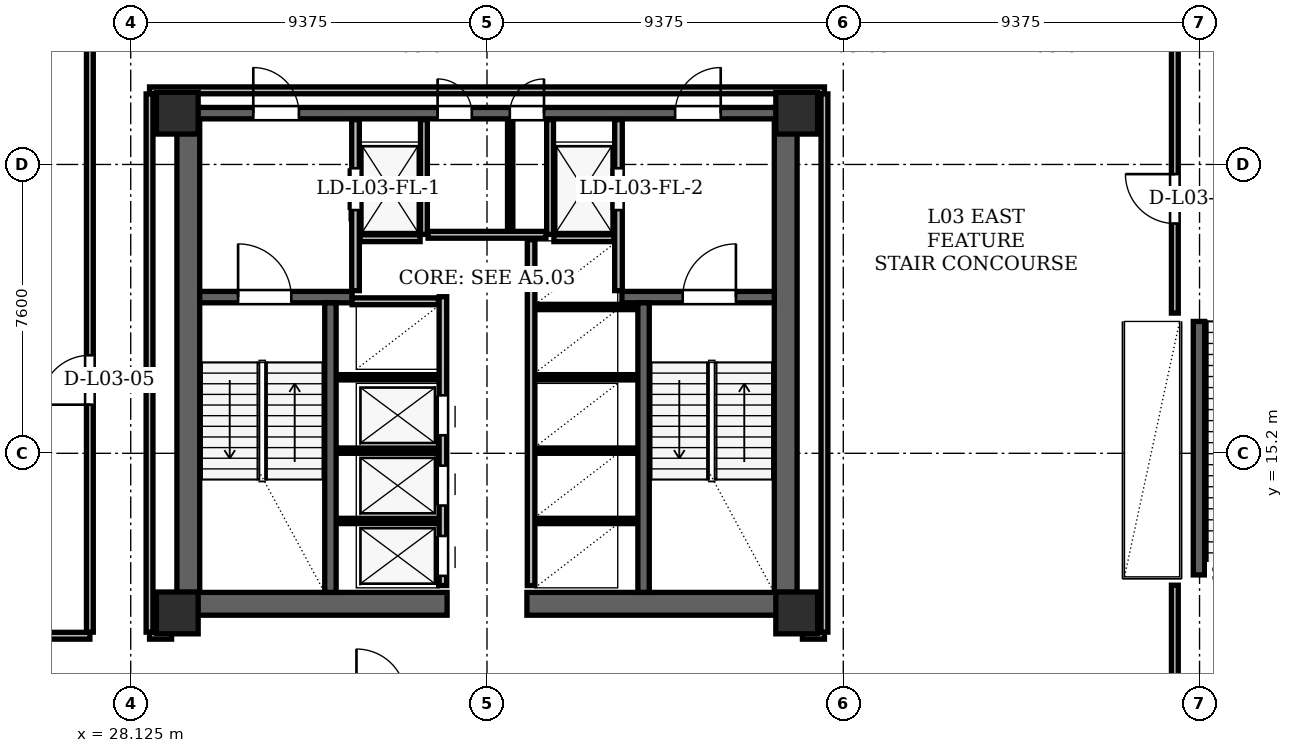
"""IFC4 building model, lengths in metres.
Left out: names, types, materials, properties, quantities, classifications, styles, units other than length and angle.
Written with IfcOpenShell. Run it as: python <this file> out.ifc"""

import sys

from ifc_helpers import new_model, si_unit, direction, frame, frame_2d, origin, origin_2d, place, context, subcontext, project, spatial, rectangle, hollow_rectangle, extrude, element, fill, save


model = new_model("IFC4")
c1 = context("Model", 3, precision=1e-05, world=origin(), true_north=direction((0.0, 1.0)))
c2 = subcontext(c1, "Body", "Model", "MODEL_VIEW")
j1 = project(units=[si_unit("LENGTHUNIT", "METRE"), si_unit("PLANEANGLEUNIT", "RADIAN")], contexts=[c1])
p1 = place(None, origin())
s1 = spatial("IfcSite", under=j1, at=p1, CompositionType="ELEMENT")
p2 = place(p1, origin())
s2 = spatial("IfcBuilding", under=s1, at=p2, CompositionType="ELEMENT")
p3 = place(p2, frame((0.0, 0.0, 14.1)))
s3 = spatial("IfcBuildingStorey", under=s2, at=p3, CompositionType="ELEMENT", Elevation=14.1)
for number, where, z_axis, x_axis in (
    (1, (29.35, 11.0, 0.0), (0.0, 0.0, 1.0), (1.0, 0.0, 0.0)),
    (2, (45.65, 11.0, 0.0), (0.0, 0.0, 1.0), (1.0, 0.0, 0.0)),
    (3, (45.65, 24.15, 0.0), (0.0, 0.0, 1.0), (1.0, 0.0, 0.0)),
    (4, (29.35, 24.15, 0.0), (0.0, 0.0, 1.0), (1.0, 0.0, 0.0)),
):
    element("IfcColumn", number, at=place(p3, frame(where, z_axis=z_axis, x_axis=x_axis)), inside=s3, PredefinedType="COLUMN", context=c2, shape_type="SweptSolid", body=[
        extrude(hollow_rectangle(XDim=1.1, YDim=1.1, WallThickness=0.09, at=origin_2d()), origin(), (0.0, 0.0, 1.0), 4.2),
    ])
for number, where, z_axis, x_axis in (
    (5, (29.64, 11.0, 0.0), (0.0, 0.0, 1.0), (0.0, 1.0, 0.0)),
    (6, (45.36, 11.0, 0.0), (0.0, 0.0, 1.0), (0.0, 1.0, 0.0)),
):
    element("IfcWall", number, at=place(p3, frame(where, z_axis=z_axis, x_axis=x_axis)), inside=s3, PredefinedType="SHEAR", context=c2, shape_type="SweptSolid", body=[
        extrude(rectangle(XDim=13.3, YDim=0.6, at=frame_2d((6.65, 0.0))), origin(), (0.0, 0.0, 1.0), 3.92),
    ])
for number, where, z_axis, x_axis in (
    (7, (29.35, 11.24, 0.0), (0.0, 0.0, 1.0), (1.0, 0.0, 0.0)),
    (8, (38.55, 11.24, 0.0), (0.0, 0.0, 1.0), (1.0, 0.0, 0.0)),
):
    element("IfcWall", number, at=place(p3, frame(where, z_axis=z_axis, x_axis=x_axis)), inside=s3, PredefinedType="SHEAR", context=c2, shape_type="SweptSolid", body=[
        extrude(rectangle(XDim=7.1, YDim=0.6, at=frame_2d((3.55, 0.0))), origin(), (0.0, 0.0, 1.0), 3.92),
    ])
p4 = place(p3, frame((29.65, 24.15, 0.0), z_axis=(0.0, 0.0, 1.0), x_axis=(1.0, 0.0, 0.0)))
e9 = element("IfcWall", 9, at=p4, inside=s3, PredefinedType="SHEAR", context=c2, shape_type="SweptSolid", body=[
    extrude(rectangle(XDim=15.7, YDim=0.3, at=frame_2d((7.85, 0.0))), origin(), (0.0, 0.0, 1.0), 3.92),
])
p5 = place(p4, frame((1.7, 0.0, 0.0)))
e10 = element("IfcOpeningElement", 10, at=p5, cuts=e9, PredefinedType="OPENING", context=c2, shape_type="SweptSolid", body=[
    extrude(rectangle(XDim=1.2, YDim=2.2, at=frame_2d((0.6, 1.1))), frame((0.0, 0.15, 0.0), z_axis=(0.0, -1.0, 0.0), x_axis=(1.0, 0.0, 0.0)), (0.0, 0.0, 1.0), 0.3),
])
p6 = place(p4, frame((12.8, 0.0, 0.0)))
e11 = element("IfcOpeningElement", 11, at=p6, cuts=e9, PredefinedType="OPENING", context=c2, shape_type="SweptSolid", body=[
    extrude(rectangle(XDim=1.2, YDim=2.2, at=frame_2d((0.6, 1.1))), frame((0.0, 0.15, 0.0), z_axis=(0.0, -1.0, 0.0), x_axis=(1.0, 0.0, 0.0)), (0.0, 0.0, 1.0), 0.3),
])
p7 = place(p4, frame((6.55, 0.0, 0.0)))
e12 = element("IfcOpeningElement", 12, at=p7, cuts=e9, PredefinedType="OPENING", context=c2, shape_type="SweptSolid", body=[
    extrude(rectangle(XDim=0.9, YDim=2.05, at=frame_2d((0.45, 1.025))), frame((0.0, 0.15, 0.0), z_axis=(0.0, -1.0, 0.0), x_axis=(1.0, 0.0, 0.0)), (0.0, 0.0, 1.0), 0.3),
])
p8 = place(p4, frame((8.45, 0.0, 0.0)))
e13 = element("IfcOpeningElement", 13, at=p8, cuts=e9, PredefinedType="OPENING", context=c2, shape_type="SweptSolid", body=[
    extrude(rectangle(XDim=0.9, YDim=2.05, at=frame_2d((0.45, 1.025))), frame((0.0, 0.15, 0.0), z_axis=(0.0, -1.0, 0.0), x_axis=(1.0, 0.0, 0.0)), (0.0, 0.0, 1.0), 0.3),
])
p9 = place(p3, frame((29.94, 19.31, 0.0), z_axis=(0.0, 0.0, 1.0), x_axis=(1.0, 0.0, 0.0)))
e14 = element("IfcWall", 14, at=p9, inside=s3, PredefinedType="SHEAR", context=c2, shape_type="SweptSolid", body=[
    extrude(rectangle(XDim=4.01, YDim=0.3, at=frame_2d((2.005, 0.0))), origin(), (0.0, 0.0, 1.0), 3.92),
])
p10 = place(p9, frame((1.01, 0.0, 0.0)))
e15 = element("IfcOpeningElement", 15, at=p10, cuts=e14, PredefinedType="OPENING", context=c2, shape_type="SweptSolid", body=[
    extrude(rectangle(XDim=1.4, YDim=2.2, at=frame_2d((0.7, 1.1))), frame((0.0, 0.15, 0.0), z_axis=(0.0, -1.0, 0.0), x_axis=(1.0, 0.0, 0.0)), (0.0, 0.0, 1.0), 0.3),
])
p11 = place(p3, frame((41.05, 19.31, 0.0), z_axis=(0.0, 0.0, 1.0), x_axis=(1.0, 0.0, 0.0)))
e16 = element("IfcWall", 16, at=p11, inside=s3, PredefinedType="SHEAR", context=c2, shape_type="SweptSolid", body=[
    extrude(rectangle(XDim=4.01, YDim=0.3, at=frame_2d((2.005, 0.0))), origin(), (0.0, 0.0, 1.0), 3.92),
])
p12 = place(p11, frame((1.6, 0.0, 0.0)))
e17 = element("IfcOpeningElement", 17, at=p12, cuts=e16, PredefinedType="OPENING", context=c2, shape_type="SweptSolid", body=[
    extrude(rectangle(XDim=1.4, YDim=2.2, at=frame_2d((0.7, 1.1))), frame((0.0, 0.15, 0.0), z_axis=(0.0, -1.0, 0.0), x_axis=(1.0, 0.0, 0.0)), (0.0, 0.0, 1.0), 0.3),
])
for number, where, z_axis, x_axis in (
    (18, (33.38, 11.54, 0.0), (0.0, 0.0, 1.0), (0.0, 1.0, 0.0)),
    (19, (41.62, 11.54, 0.0), (0.0, 0.0, 1.0), (0.0, 1.0, 0.0)),
):
    element("IfcWall", number, at=place(p3, frame(where, z_axis=z_axis, x_axis=x_axis)), inside=s3, PredefinedType="SHEAR", context=c2, shape_type="SweptSolid", body=[
        extrude(rectangle(XDim=7.62, YDim=0.3, at=frame_2d((3.81, 0.0))), origin(), (0.0, 0.0, 1.0), 3.92),
    ])
p13 = place(p3, frame((56.235, 12.0, 0.0), z_axis=(0.0, 0.0, 1.0), x_axis=(0.0, 1.0, 0.0)))
e20 = element("IfcWall", 20, at=p13, inside=s3, PredefinedType="SHEAR", context=c2, shape_type="SweptSolid", body=[
    extrude(rectangle(XDim=6.67, YDim=0.3, at=frame_2d((3.335, 0.0))), origin(), (0.0, 0.0, 1.0), 3.92),
])
p14 = place(p3, frame((34.04, 19.48, 0.0), z_axis=(0.0, 0.0, 1.0), x_axis=(0.0, 1.0, 0.0)))
e21 = element("IfcWall", 21, at=p14, inside=s3, PredefinedType="PARTITIONING", context=c2, shape_type="SweptSolid", body=[
    extrude(rectangle(XDim=4.5, YDim=0.2, at=frame_2d((2.25, 0.0))), origin(), (0.0, 0.0, 1.0), 2.96),
])
p15 = place(p14, frame((2.12, 0.0, 0.0)))
e22 = element("IfcOpeningElement", 22, at=p15, cuts=e21, PredefinedType="OPENING", context=c2, shape_type="SweptSolid", body=[
    extrude(rectangle(XDim=1.1, YDim=2.2, at=frame_2d((0.55, 1.1))), frame((0.0, 0.1, 0.0), z_axis=(0.0, -1.0, 0.0), x_axis=(1.0, 0.0, 0.0)), (0.0, 0.0, 1.0), 0.2),
])
p16 = place(p3, frame((35.84, 20.96, 0.0), z_axis=(0.0, 0.0, 1.0), x_axis=(0.0, 1.0, 0.0)))
e23 = element("IfcWall", 23, at=p16, inside=s3, PredefinedType="PARTITIONING", context=c2, shape_type="SweptSolid", body=[
    extrude(rectangle(XDim=3.02, YDim=0.18, at=frame_2d((1.51, 0.0))), origin(), (0.0, 0.0, 1.0), 2.96),
])
p17 = place(p3, frame((34.16, 20.86, 0.0), z_axis=(0.0, 0.0, 1.0), x_axis=(1.0, 0.0, 0.0)))
e24 = element("IfcWall", 24, at=p17, inside=s3, PredefinedType="PARTITIONING", context=c2, shape_type="SweptSolid", body=[
    extrude(rectangle(XDim=1.58, YDim=0.18, at=frame_2d((0.79, 0.0))), origin(), (0.0, 0.0, 1.0), 3.92),
])
p18 = place(p3, frame((40.96, 19.48, 0.0), z_axis=(0.0, 0.0, 1.0), x_axis=(0.0, 1.0, 0.0)))
e25 = element("IfcWall", 25, at=p18, inside=s3, PredefinedType="PARTITIONING", context=c2, shape_type="SweptSolid", body=[
    extrude(rectangle(XDim=4.5, YDim=0.2, at=frame_2d((2.25, 0.0))), origin(), (0.0, 0.0, 1.0), 2.96),
])
p19 = place(p18, frame((2.12, 0.0, 0.0)))
e26 = element("IfcOpeningElement", 26, at=p19, cuts=e25, PredefinedType="OPENING", context=c2, shape_type="SweptSolid", body=[
    extrude(rectangle(XDim=1.1, YDim=2.2, at=frame_2d((0.55, 1.1))), frame((0.0, 0.1, 0.0), z_axis=(0.0, -1.0, 0.0), x_axis=(1.0, 0.0, 0.0)), (0.0, 0.0, 1.0), 0.2),
])
p20 = place(p3, frame((39.16, 20.96, 0.0), z_axis=(0.0, 0.0, 1.0), x_axis=(0.0, 1.0, 0.0)))
e27 = element("IfcWall", 27, at=p20, inside=s3, PredefinedType="PARTITIONING", context=c2, shape_type="SweptSolid", body=[
    extrude(rectangle(XDim=3.02, YDim=0.18, at=frame_2d((1.51, 0.0))), origin(), (0.0, 0.0, 1.0), 2.96),
])
p21 = place(p3, frame((39.26, 20.86, 0.0), z_axis=(0.0, 0.0, 1.0), x_axis=(1.0, 0.0, 0.0)))
e28 = element("IfcWall", 28, at=p21, inside=s3, PredefinedType="PARTITIONING", context=c2, shape_type="SweptSolid", body=[
    extrude(rectangle(XDim=1.58, YDim=0.18, at=frame_2d((0.79, 0.0))), origin(), (0.0, 0.0, 1.0), 3.92),
])
p22 = place(p3, frame((36.34, 11.72, 0.0), z_axis=(0.0, 0.0, 1.0), x_axis=(0.0, 1.0, 0.0)))
e29 = element("IfcWall", 29, at=p22, inside=s3, PredefinedType="PARTITIONING", context=c2, shape_type="SweptSolid", body=[
    extrude(rectangle(XDim=7.6, YDim=0.2, at=frame_2d((3.8, 0.0))), origin(), (0.0, 0.0, 1.0), 3.92),
])
p23 = place(p22, frame((0.255, 0.0, 0.0)))
e30 = element("IfcOpeningElement", 30, at=p23, cuts=e29, PredefinedType="OPENING", context=c2, shape_type="SweptSolid", body=[
    extrude(rectangle(XDim=1.05, YDim=2.15, at=frame_2d((0.525, 1.075))), frame((0.0, 0.1, 0.0), z_axis=(0.0, -1.0, 0.0), x_axis=(1.0, 0.0, 0.0)), (0.0, 0.0, 1.0), 0.2),
])
p24 = place(p22, frame((2.105, 0.0, 0.0)))
e31 = element("IfcOpeningElement", 31, at=p24, cuts=e29, PredefinedType="OPENING", context=c2, shape_type="SweptSolid", body=[
    extrude(rectangle(XDim=1.05, YDim=2.15, at=frame_2d((0.525, 1.075))), frame((0.0, 0.1, 0.0), z_axis=(0.0, -1.0, 0.0), x_axis=(1.0, 0.0, 0.0)), (0.0, 0.0, 1.0), 0.2),
])
p25 = place(p22, frame((3.955, 0.0, 0.0)))
e32 = element("IfcOpeningElement", 32, at=p25, cuts=e29, PredefinedType="OPENING", context=c2, shape_type="SweptSolid", body=[
    extrude(rectangle(XDim=1.05, YDim=2.15, at=frame_2d((0.525, 1.075))), frame((0.0, 0.1, 0.0), z_axis=(0.0, -1.0, 0.0), x_axis=(1.0, 0.0, 0.0)), (0.0, 0.0, 1.0), 0.2),
])
p26 = place(p3, frame((33.95, 19.2, 0.0), z_axis=(0.0, 0.0, 1.0), x_axis=(1.0, 0.0, 0.0)))
e33 = element("IfcWall", 33, at=p26, inside=s3, PredefinedType="PARTITIONING", context=c2, shape_type="SweptSolid", body=[
    extrude(rectangle(XDim=2.27, YDim=0.18, at=frame_2d((1.135, 0.0))), origin(), (0.0, 0.0, 1.0), 3.92),
])
for number, where, z_axis, x_axis in (
    (34, (33.56, 13.42, 0.0), (0.0, 0.0, 1.0), (1.0, 0.0, 0.0)),
    (35, (33.56, 15.27, 0.0), (0.0, 0.0, 1.0), (1.0, 0.0, 0.0)),
    (36, (33.56, 17.2, 0.0), (0.0, 0.0, 1.0), (1.0, 0.0, 0.0)),
):
    element("IfcWall", number, at=place(p3, frame(where, z_axis=z_axis, x_axis=x_axis)), inside=s3, PredefinedType="PARTITIONING", context=c2, shape_type="SweptSolid", body=[
        extrude(rectangle(XDim=2.66, YDim=0.14, at=frame_2d((1.33, 0.0))), origin(), (0.0, 0.0, 1.0), 3.92),
    ])
p27 = place(p3, frame((38.66, 11.72, 0.0), z_axis=(0.0, 0.0, 1.0), x_axis=(0.0, 1.0, 0.0)))
e37 = element("IfcWall", 37, at=p27, inside=s3, PredefinedType="PARTITIONING", context=c2, shape_type="SweptSolid", body=[
    extrude(rectangle(XDim=9.1, YDim=0.2, at=frame_2d((4.55, 0.0))), origin(), (0.0, 0.0, 1.0), 3.92),
])
for number, where, z_axis, x_axis in (
    (38, (38.78, 13.42, 0.0), (0.0, 0.0, 1.0), (1.0, 0.0, 0.0)),
    (39, (38.78, 15.27, 0.0), (0.0, 0.0, 1.0), (1.0, 0.0, 0.0)),
    (40, (38.78, 17.2, 0.0), (0.0, 0.0, 1.0), (1.0, 0.0, 0.0)),
    (41, (38.78, 19.05, 0.0), (0.0, 0.0, 1.0), (1.0, 0.0, 0.0)),
):
    element("IfcWall", number, at=place(p3, frame(where, z_axis=z_axis, x_axis=x_axis)), inside=s3, PredefinedType="PARTITIONING", context=c2, shape_type="SweptSolid", body=[
        extrude(rectangle(XDim=2.66, YDim=0.14, at=frame_2d((1.33, 0.0))), origin(), (0.0, 0.0, 1.0), 3.92),
    ])
p28 = place(p3, frame((35.95, 20.95, 0.0), z_axis=(0.0, 0.0, 1.0), x_axis=(1.0, 0.0, 0.0)))
e42 = element("IfcWall", 42, at=p28, inside=s3, PredefinedType="PARTITIONING", context=c2, shape_type="SweptSolid", body=[
    extrude(rectangle(XDim=3.1, YDim=0.18, at=frame_2d((1.55, 0.0))), origin(), (0.0, 0.0, 1.0), 3.92),
])
p29 = place(p3, frame((38.11, 21.06, 0.0), z_axis=(0.0, 0.0, 1.0), x_axis=(0.0, 1.0, 0.0)))
e43 = element("IfcWall", 43, at=p29, inside=s3, PredefinedType="PARTITIONING", context=c2, shape_type="SweptSolid", body=[
    extrude(rectangle(XDim=2.92, YDim=0.14, at=frame_2d((1.46, 0.0))), origin(), (0.0, 0.0, 1.0), 2.96),
])
p30 = place(p3, frame((16.25, 10.4, 0.0), z_axis=(0.0, 0.0, 1.0), x_axis=(1.0, 0.0, 0.0)))
e44 = element("IfcWall", 44, at=p30, inside=s3, PredefinedType="PARTITIONING", context=c2, shape_type="SweptSolid", body=[
    extrude(rectangle(XDim=10.8, YDim=0.18, at=frame_2d((5.4, 0.0))), origin(), (0.0, 0.0, 1.0), 3.92),
])
for number, where, z_axis, x_axis in (
    (45, (28.62, 10.4, 0.0), (0.0, 0.0, 1.0), (1.0, 0.0, 0.0)),
    (46, (45.8, 10.4, 0.0), (0.0, 0.0, 1.0), (1.0, 0.0, 0.0)),
):
    element("IfcWall", number, at=place(p3, frame(where, z_axis=z_axis, x_axis=x_axis)), inside=s3, PredefinedType="PARTITIONING", context=c2, shape_type="SweptSolid", body=[
        extrude(rectangle(XDim=0.58, YDim=0.18, at=frame_2d((0.29, 0.0))), origin(), (0.0, 0.0, 1.0), 2.983),
    ])
p31 = place(p3, frame((28.62, 24.75, 0.0), z_axis=(0.0, 0.0, 1.0), x_axis=(1.0, 0.0, 0.0)))
e47 = element("IfcWall", 47, at=p31, inside=s3, PredefinedType="PARTITIONING", context=c2, shape_type="SweptSolid", body=[
    extrude(rectangle(XDim=17.76, YDim=0.18, at=frame_2d((8.88, 0.0))), origin(), (0.0, 0.0, 1.0), 2.983),
])
p32 = place(p3, frame((27.05, 10.494, 0.0), z_axis=(0.0, 0.0, 1.0), x_axis=(0.0, 1.0, 0.0)))
e48 = element("IfcWall", 48, at=p32, inside=s3, PredefinedType="PARTITIONING", context=c2, shape_type="SweptSolid", body=[
    extrude(rectangle(XDim=28.386, YDim=0.18, at=frame_2d((14.193, 0.0))), origin(), (0.0, 0.0, 1.0), 2.983),
])
p33 = place(p32, frame((5.985, 0.0, 0.0)))
e49 = element("IfcOpeningElement", 49, at=p33, cuts=e48, PredefinedType="OPENING", context=c2, shape_type="SweptSolid", body=[
    extrude(rectangle(XDim=1.3, YDim=2.2, at=frame_2d((0.65, 1.1))), frame((0.0, 0.09, 0.0), z_axis=(0.0, -1.0, 0.0), x_axis=(1.0, 0.0, 0.0)), (0.0, 0.0, 1.0), 0.18),
])
p34 = place(p3, frame((28.62, 10.494, 0.0), z_axis=(0.0, 0.0, 1.0), x_axis=(0.0, 1.0, 0.0)))
e50 = element("IfcWall", 50, at=p34, inside=s3, PredefinedType="PARTITIONING", context=c2, shape_type="SweptSolid", body=[
    extrude(rectangle(XDim=14.162, YDim=0.18, at=frame_2d((7.081, 0.0))), origin(), (0.0, 0.0, 1.0), 2.983),
])
p35 = place(p3, frame((46.38, 10.494, 0.0), z_axis=(0.0, 0.0, 1.0), x_axis=(0.0, 1.0, 0.0)))
e51 = element("IfcWall", 51, at=p35, inside=s3, PredefinedType="PARTITIONING", context=c2, shape_type="SweptSolid", body=[
    extrude(rectangle(XDim=14.162, YDim=0.18, at=frame_2d((7.081, 0.0))), origin(), (0.0, 0.0, 1.0), 3.92),
])
p36 = place(p3, frame((55.6, 1.844, 0.0), z_axis=(0.0, 0.0, 1.0), x_axis=(0.0, 1.0, 0.0)))
e52 = element("IfcWall", 52, at=p36, inside=s3, PredefinedType="PARTITIONING", context=c2, shape_type="SweptSolid", body=[
    extrude(rectangle(XDim=9.886, YDim=0.18, at=frame_2d((4.943, 0.0))), origin(), (0.0, 0.0, 1.0), 3.054),
])
p37 = place(p3, frame((55.6, 18.889, 0.0), z_axis=(0.0, 0.0, 1.0), x_axis=(0.0, 1.0, 0.0)))
e53 = element("IfcWall", 53, at=p37, inside=s3, PredefinedType="PARTITIONING", context=c2, shape_type="SweptSolid", body=[
    extrude(rectangle(XDim=24.867, YDim=0.18, at=frame_2d((12.433, 0.0))), origin(), (0.0, 0.0, 1.0), 2.71),
])
p38 = place(p37, frame((2.356, 0.0, 0.0)))
e54 = element("IfcOpeningElement", 54, at=p38, cuts=e53, PredefinedType="OPENING", context=c2, shape_type="SweptSolid", body=[
    extrude(rectangle(XDim=1.3, YDim=2.2, at=frame_2d((0.65, 1.1))), frame((0.0, 0.09, 0.0), z_axis=(0.0, -1.0, 0.0), x_axis=(1.0, 0.0, 0.0)), (0.0, 0.0, 1.0), 0.18),
])
p39 = place(p15, origin())
e55 = element("IfcDoor", 55, at=p39, inside=s3, OperationType="SLIDING_TO_LEFT", PredefinedType="DOOR", context=c2, shape_type="SweptSolid", body=[
    extrude(rectangle(XDim=1.1, YDim=2.2, at=frame_2d((0.55, 1.1))), frame((0.0, 0.025, 0.0), z_axis=(0.0, -1.0, 0.0), x_axis=(1.0, 0.0, 0.0)), (0.0, 0.0, 1.0), 0.05),
])
fill(e22, e55)
p40 = place(p19, origin())
e56 = element("IfcDoor", 56, at=p40, inside=s3, OperationType="SLIDING_TO_RIGHT", PredefinedType="DOOR", context=c2, shape_type="SweptSolid", body=[
    extrude(rectangle(XDim=1.1, YDim=2.2, at=frame_2d((0.55, 1.1))), frame((0.0, 0.025, 0.0), z_axis=(0.0, -1.0, 0.0), x_axis=(1.0, 0.0, 0.0)), (0.0, 0.0, 1.0), 0.05),
])
fill(e26, e56)
p41 = place(p23, origin())
e57 = element("IfcDoor", 57, at=p41, inside=s3, OperationType="SLIDING_TO_LEFT", PredefinedType="DOOR", context=c2, shape_type="SweptSolid", body=[
    extrude(rectangle(XDim=1.05, YDim=2.15, at=frame_2d((0.525, 1.075))), frame((0.0, 0.025, 0.0), z_axis=(0.0, -1.0, 0.0), x_axis=(1.0, 0.0, 0.0)), (0.0, 0.0, 1.0), 0.05),
])
fill(e30, e57)
p42 = place(p24, origin())
e58 = element("IfcDoor", 58, at=p42, inside=s3, OperationType="SLIDING_TO_RIGHT", PredefinedType="DOOR", context=c2, shape_type="SweptSolid", body=[
    extrude(rectangle(XDim=1.05, YDim=2.15, at=frame_2d((0.525, 1.075))), frame((0.0, 0.025, 0.0), z_axis=(0.0, -1.0, 0.0), x_axis=(1.0, 0.0, 0.0)), (0.0, 0.0, 1.0), 0.05),
])
fill(e31, e58)
p43 = place(p25, origin())
e59 = element("IfcDoor", 59, at=p43, inside=s3, OperationType="SLIDING_TO_LEFT", PredefinedType="DOOR", context=c2, shape_type="SweptSolid", body=[
    extrude(rectangle(XDim=1.05, YDim=2.15, at=frame_2d((0.525, 1.075))), frame((0.0, 0.025, 0.0), z_axis=(0.0, -1.0, 0.0), x_axis=(1.0, 0.0, 0.0)), (0.0, 0.0, 1.0), 0.05),
])
fill(e32, e59)
p44 = place(p10, origin())
e60 = element("IfcDoor", 60, at=p44, inside=s3, OperationType="SINGLE_SWING_LEFT", PredefinedType="DOOR", context=c2, shape_type="SweptSolid", body=[
    extrude(rectangle(XDim=1.4, YDim=2.2, at=frame_2d((0.7, 1.1))), frame((0.0, 0.025, 0.0), z_axis=(0.0, -1.0, 0.0), x_axis=(1.0, 0.0, 0.0)), (0.0, 0.0, 1.0), 0.05),
])
fill(e15, e60)
p45 = place(p12, origin())
e61 = element("IfcDoor", 61, at=p45, inside=s3, OperationType="SINGLE_SWING_RIGHT", PredefinedType="DOOR", context=c2, shape_type="SweptSolid", body=[
    extrude(rectangle(XDim=1.4, YDim=2.2, at=frame_2d((0.7, 1.1))), frame((0.0, 0.025, 0.0), z_axis=(0.0, -1.0, 0.0), x_axis=(1.0, 0.0, 0.0)), (0.0, 0.0, 1.0), 0.05),
])
fill(e17, e61)
p46 = place(p5, origin())
e62 = element("IfcDoor", 62, at=p46, inside=s3, OperationType="SINGLE_SWING_LEFT", PredefinedType="DOOR", context=c2, shape_type="SweptSolid", body=[
    extrude(rectangle(XDim=1.2, YDim=2.2, at=frame_2d((0.6, 1.1))), frame((0.0, 0.025, 0.0), z_axis=(0.0, -1.0, 0.0), x_axis=(1.0, 0.0, 0.0)), (0.0, 0.0, 1.0), 0.05),
])
fill(e10, e62)
p47 = place(p6, origin())
e63 = element("IfcDoor", 63, at=p47, inside=s3, OperationType="SINGLE_SWING_RIGHT", PredefinedType="DOOR", context=c2, shape_type="SweptSolid", body=[
    extrude(rectangle(XDim=1.2, YDim=2.2, at=frame_2d((0.6, 1.1))), frame((0.0, 0.025, 0.0), z_axis=(0.0, -1.0, 0.0), x_axis=(1.0, 0.0, 0.0)), (0.0, 0.0, 1.0), 0.05),
])
fill(e11, e63)
p48 = place(p7, origin())
e64 = element("IfcDoor", 64, at=p48, inside=s3, OperationType="SINGLE_SWING_LEFT", PredefinedType="DOOR", context=c2, shape_type="SweptSolid", body=[
    extrude(rectangle(XDim=0.9, YDim=2.05, at=frame_2d((0.45, 1.025))), frame((0.0, 0.025, 0.0), z_axis=(0.0, -1.0, 0.0), x_axis=(1.0, 0.0, 0.0)), (0.0, 0.0, 1.0), 0.05),
])
fill(e12, e64)
p49 = place(p8, origin())
e65 = element("IfcDoor", 65, at=p49, inside=s3, OperationType="SINGLE_SWING_RIGHT", PredefinedType="DOOR", context=c2, shape_type="SweptSolid", body=[
    extrude(rectangle(XDim=0.9, YDim=2.05, at=frame_2d((0.45, 1.025))), frame((0.0, 0.025, 0.0), z_axis=(0.0, -1.0, 0.0), x_axis=(1.0, 0.0, 0.0)), (0.0, 0.0, 1.0), 0.05),
])
fill(e13, e65)
p50 = place(p33, origin())
e66 = element("IfcDoor", 66, at=p50, inside=s3, OperationType="SINGLE_SWING_LEFT", PredefinedType="DOOR", context=c2, shape_type="SweptSolid", body=[
    extrude(rectangle(XDim=1.3, YDim=2.2, at=frame_2d((0.65, 1.1))), frame((0.0, 0.025, 0.0), z_axis=(0.0, -1.0, 0.0), x_axis=(1.0, 0.0, 0.0)), (0.0, 0.0, 1.0), 0.05),
])
fill(e49, e66)
p51 = place(p38, origin())
e67 = element("IfcDoor", 67, at=p51, inside=s3, OperationType="SINGLE_SWING_RIGHT", PredefinedType="DOOR", context=c2, shape_type="SweptSolid", body=[
    extrude(rectangle(XDim=1.3, YDim=2.2, at=frame_2d((0.65, 1.1))), frame((0.0, 0.025, 0.0), z_axis=(0.0, -1.0, 0.0), x_axis=(1.0, 0.0, 0.0)), (0.0, 0.0, 1.0), 0.05),
])
fill(e54, e67)
save(model, sys.argv[1])
